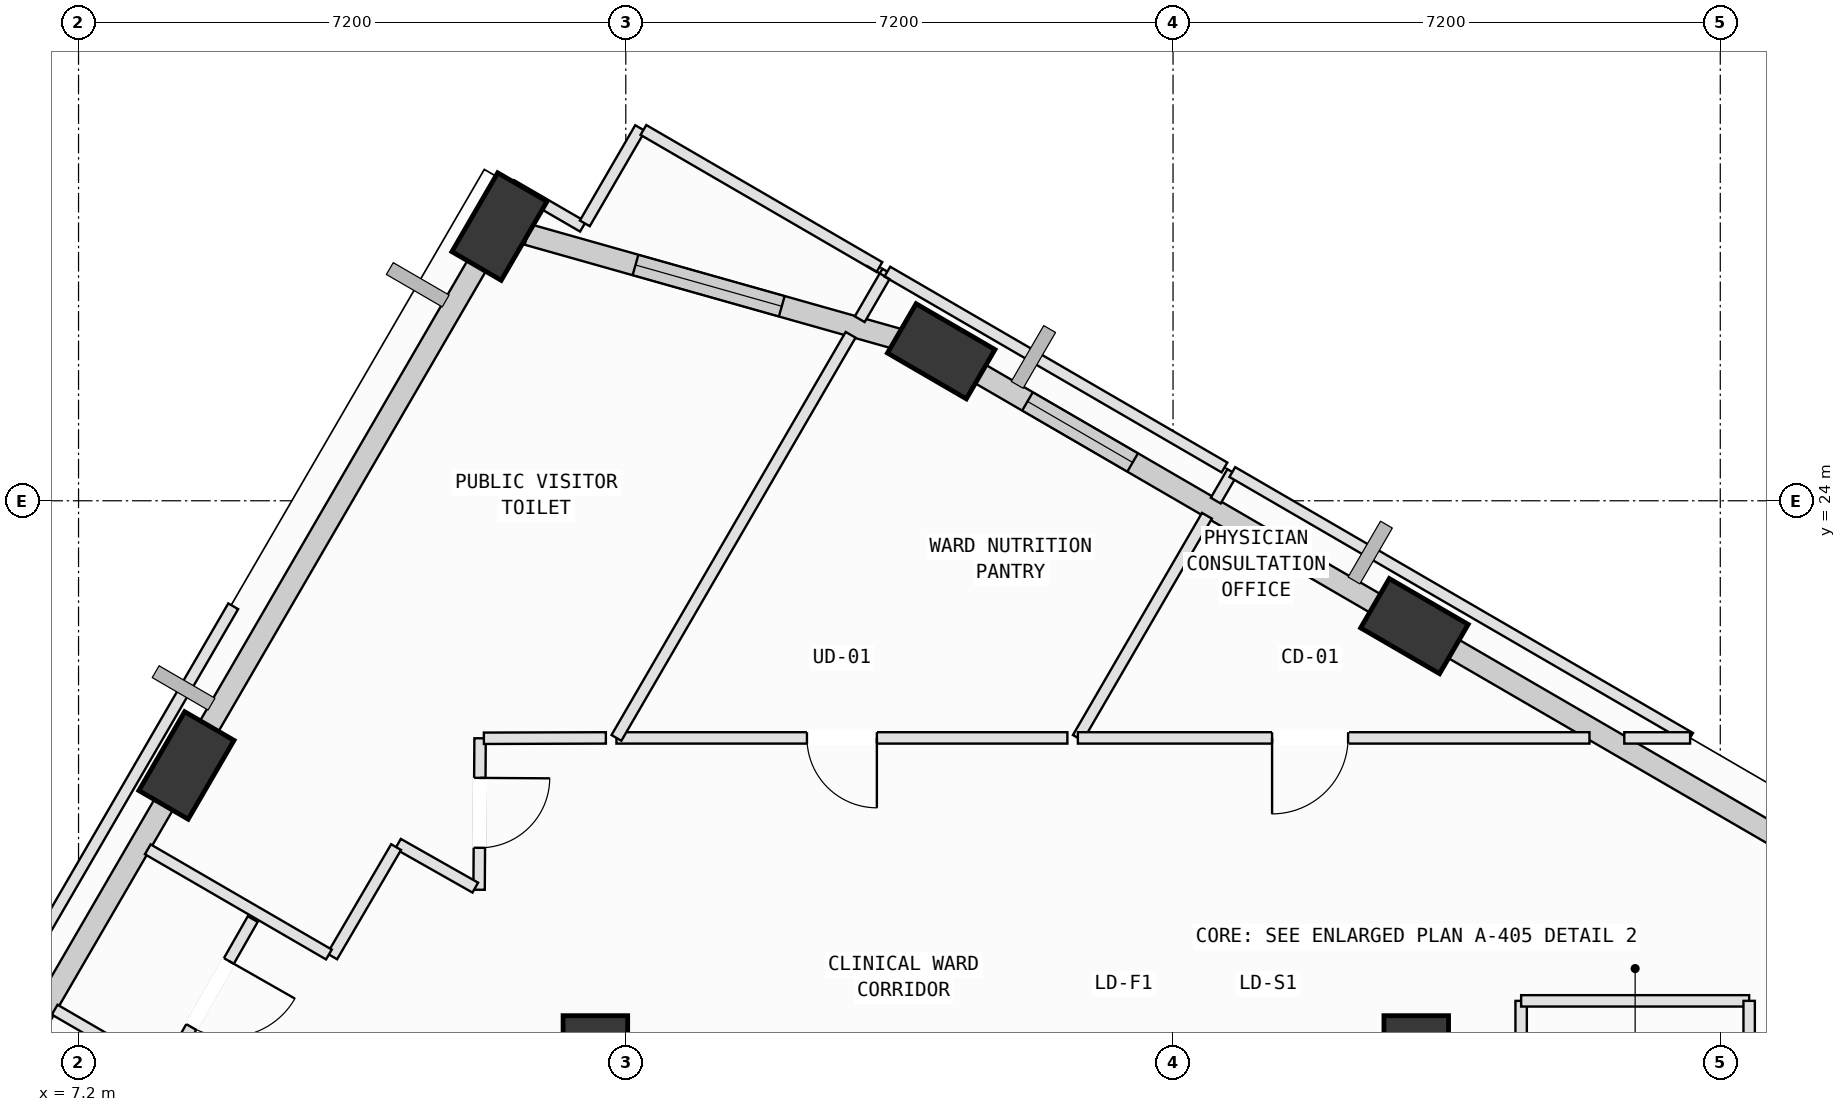
"""IFC4 building model, lengths in metres.
Left out: names, types, materials, properties, quantities, classifications, styles, units other than length and angle.
Written with IfcOpenShell. Run it as: python <this file> out.ifc"""

import sys

from ifc_helpers import new_model, si_unit, direction, frame, frame_2d, origin, origin_2d, place, context, subcontext, project, spatial, rectangle, extrude, element, fill, save


model = new_model("IFC4")
c1 = context("Model", 3, precision=1e-05, world=origin(), true_north=direction((0.0, 1.0)))
c2 = subcontext(c1, "Body", "Model", "MODEL_VIEW")
j1 = project(units=[si_unit("LENGTHUNIT", "METRE"), si_unit("PLANEANGLEUNIT", "RADIAN")], contexts=[c1])
p1 = place(None, origin())
s1 = spatial("IfcSite", under=j1, at=p1, CompositionType="ELEMENT")
p2 = place(p1, origin())
s2 = spatial("IfcBuilding", under=s1, at=p2, CompositionType="ELEMENT")
p3 = place(p2, frame((0.0, 0.0, 280.6)))
s3 = spatial("IfcBuildingStorey", under=s2, at=p3, CompositionType="ELEMENT", Elevation=280.6)
for number, where, z_axis, x_axis in (
    (1, (14.0, 16.8, 0.0), (0.0, 0.0, 1.0), (1.0, 0.0, 0.0)),
    (2, (24.8, 16.8, 0.0), (0.0, 0.0, 1.0), (1.0, 0.0, 0.0)),
):
    element("IfcColumn", number, at=place(p3, frame(where, z_axis=z_axis, x_axis=x_axis)), inside=s3, PredefinedType="COLUMN", context=c2, shape_type="SweptSolid", body=[
        extrude(rectangle(XDim=0.85, YDim=0.85, at=origin_2d()), origin(), (0.0, 0.0, 1.0), 4.0),
    ])
p4 = place(p3, frame((24.776, 22.351, 0.002), z_axis=(0.010439066111, -0.036445160635, 0.999281129695), x_axis=(-0.969488829327, 0.244394845275, 0.019041255571)))
e3 = element("IfcColumn", 3, at=p4, inside=s3, PredefinedType="COLUMN", context=c2, shape_type="SweptSolid", body=[
    extrude(rectangle(XDim=1.2, YDim=0.75, at=origin_2d()), origin(), (0.0, 0.0, 1.0), 3.999),
])
p5 = place(p3, frame((18.55, 25.967, 0.002), z_axis=(-0.004328997208, -0.062313171074, 0.998047257646), x_axis=(-0.827892947703, 0.560008026617, 0.03137319347)))
e4 = element("IfcColumn", 4, at=p5, inside=s3, PredefinedType="COLUMN", context=c2, shape_type="SweptSolid", body=[
    extrude(rectangle(XDim=1.2, YDim=0.75, at=origin_2d()), origin(), (0.0, 0.0, 1.0), 4.004),
])
p6 = place(p3, frame((12.738, 27.608, 0.002), z_axis=(-0.01089391404, -0.086238414493, 0.99621496601), x_axis=(0.60626733856, 0.791700868154, 0.075164150759)))
e5 = element("IfcColumn", 5, at=p6, inside=s3, PredefinedType="COLUMN", context=c2, shape_type="SweptSolid", body=[
    extrude(rectangle(XDim=1.2, YDim=0.75, at=origin_2d()), origin(), (0.0, 0.0, 1.0), 4.011),
])
p7 = place(p3, frame((8.62, 20.517, 0.002), z_axis=(0.018469996615, -0.102860869307, 0.994524258523), x_axis=(0.342369599911, 0.935209458744, 0.090367722847)))
e6 = element("IfcColumn", 6, at=p7, inside=s3, PredefinedType="COLUMN", context=c2, shape_type="SweptSolid", body=[
    extrude(rectangle(XDim=1.2, YDim=0.75, at=origin_2d()), origin(), (0.0, 0.0, 1.0), 4.018),
])
p8 = place(p3, frame((25.164, 22.125, 0.0), z_axis=(0.0, 0.0, 1.0), x_axis=(0.864712756105, -0.502266711448, 0.0)))
e7 = element("IfcWall", 7, at=p8, inside=s3, PredefinedType="SOLIDWALL", context=c2, shape_type="SweptSolid", body=[
    extrude(rectangle(XDim=6.958, YDim=0.28, at=frame_2d((3.479, 0.0))), origin(), (0.0, 0.0, 1.0), 3.165),
])
p9 = place(p3, frame((18.927, 25.748, 0.0), z_axis=(0.0, 0.0, 1.0), x_axis=(0.864706423905, -0.502277612936, 0.0)))
e8 = element("IfcWall", 8, at=p9, inside=s3, PredefinedType="SOLIDWALL", context=c2, shape_type="SweptSolid", body=[
    extrude(rectangle(XDim=6.424, YDim=0.28, at=frame_2d((3.212, 0.0))), origin(), (0.0, 0.0, 1.0), 3.265),
])
p10 = place(p9, frame((0.876, 0.0, 0.75)))
e9 = element("IfcOpeningElement", 9, at=p10, cuts=e8, PredefinedType="OPENING", context=c2, shape_type="SweptSolid", body=[
    extrude(rectangle(XDim=1.6, YDim=1.95, at=frame_2d((0.8, 0.975))), frame((0.0, 0.15, 0.0), z_axis=(0.0, -1.0, 0.0), x_axis=(1.0, 0.0, 0.0)), (0.0, 0.0, 1.0), 0.3),
])
p11 = place(p3, frame((13.108, 27.504, 0.0), z_axis=(0.0, 0.0, 1.0), x_axis=(0.962367273923, -0.271752148256, 0.0)))
e10 = element("IfcWall", 10, at=p11, inside=s3, PredefinedType="SOLIDWALL", context=c2, shape_type="SweptSolid", body=[
    extrude(rectangle(XDim=5.302, YDim=0.28, at=frame_2d((2.651, 0.0))), origin(), (0.0, 0.0, 1.0), 3.265),
])
p12 = place(p11, frame((1.475, 0.0, 0.75)))
e11 = element("IfcOpeningElement", 11, at=p12, cuts=e10, PredefinedType="OPENING", context=c2, shape_type="SweptSolid", body=[
    extrude(rectangle(XDim=2.0, YDim=1.95, at=frame_2d((1.0, 0.975))), frame((0.0, 0.15, 0.0), z_axis=(0.0, -1.0, 0.0), x_axis=(1.0, 0.0, 0.0)), (0.0, 0.0, 1.0), 0.3),
])
p13 = place(p3, frame((8.727, 20.702, 0.0), z_axis=(0.0, 0.0, 1.0), x_axis=(0.502244841537, 0.86472545883, 0.0)))
e12 = element("IfcWall", 12, at=p13, inside=s3, PredefinedType="SOLIDWALL", context=c2, shape_type="SweptSolid", body=[
    extrude(rectangle(XDim=7.434, YDim=0.28, at=frame_2d((3.717, 0.0))), origin(), (0.0, 0.0, 1.0), 3.265),
])
p14 = place(p3, frame((4.592, 13.584, 0.0), z_axis=(0.0, 0.0, 1.0), x_axis=(0.502274010262, 0.864708516562, 0.0)))
e13 = element("IfcWall", 13, at=p14, inside=s3, PredefinedType="SOLIDWALL", context=c2, shape_type="SweptSolid", body=[
    extrude(rectangle(XDim=7.485, YDim=0.28, at=frame_2d((3.742, 0.0))), origin(), (0.0, 0.0, 1.0), 3.265),
])
p15 = place(p3, frame((26.18, 13.6, 0.0), z_axis=(0.0, 0.0, 1.0), x_axis=(0.0, 1.0, 0.0)))
e14 = element("IfcWall", 14, at=p15, inside=s3, PredefinedType="PARTITIONING", context=c2, shape_type="SweptSolid", body=[
    extrude(rectangle(XDim=3.82, YDim=0.15, at=frame_2d((1.91, 0.0))), origin(), (0.0, 0.0, 1.0), 3.78),
])
p16 = place(p15, frame((1.45, 0.0, 0.0)))
e15 = element("IfcOpeningElement", 15, at=p16, cuts=e14, PredefinedType="OPENING", context=c2, shape_type="SweptSolid", body=[
    extrude(rectangle(XDim=0.92, YDim=2.1, at=frame_2d((0.46, 1.05))), frame((0.0, 0.085, 0.0), z_axis=(0.0, -1.0, 0.0), x_axis=(1.0, 0.0, 0.0)), (0.0, 0.0, 1.0), 0.17),
])
p17 = place(p3, frame((26.18, 17.42, 0.0), z_axis=(0.0, 0.0, 1.0), x_axis=(1.0, 0.0, 0.0)))
e16 = element("IfcWall", 16, at=p17, inside=s3, PredefinedType="PARTITIONING", context=c2, shape_type="SweptSolid", body=[
    extrude(rectangle(XDim=3.0, YDim=0.15, at=frame_2d((1.5, 0.0))), origin(), (0.0, 0.0, 1.0), 3.78),
])
p18 = place(p3, frame((29.18, 17.42, 0.0), z_axis=(0.0, 0.0, 1.0), x_axis=(0.0, -1.0, 0.0)))
e17 = element("IfcWall", 17, at=p18, inside=s3, PredefinedType="PARTITIONING", context=c2, shape_type="SweptSolid", body=[
    extrude(rectangle(XDim=3.82, YDim=0.15, at=frame_2d((1.91, 0.0))), origin(), (0.0, 0.0, 1.0), 3.78),
])
p19 = place(p3, frame((6.886, 17.304, 0.0), z_axis=(0.0, 0.0, 1.0), x_axis=(0.864667908534, -0.502343914019, 0.0)))
e18 = element("IfcWall", 18, at=p19, inside=s3, PredefinedType="PARTITIONING", context=c2, shape_type="SweptSolid", body=[
    extrude(rectangle(XDim=2.854, YDim=0.15, at=frame_2d((1.427, 0.0))), origin(), (0.0, 0.0, 1.0), 3.78),
])
p20 = place(p3, frame((20.348, 20.88, 0.0), z_axis=(0.0, 0.0, 1.0), x_axis=(0.502294056982, 0.864696871927, 0.0)))
e19 = element("IfcWall", 19, at=p20, inside=s3, PredefinedType="PARTITIONING", context=c2, shape_type="SweptSolid", body=[
    extrude(rectangle(XDim=3.38, YDim=0.15, at=frame_2d((1.69, 0.0))), origin(), (0.0, 0.0, 1.0), 3.78),
])
p21 = place(p3, frame((22.162, 24.002, 0.0), z_axis=(0.0, 0.0, 1.0), x_axis=(0.501213456245, 0.865323680064, 0.0)))
e20 = element("IfcWall", 20, at=p21, inside=s3, PredefinedType="PARTITIONING", context=c2, shape_type="SweptSolid", body=[
    extrude(rectangle(XDim=0.435, YDim=0.15, at=frame_2d((0.217, 0.0))), origin(), (0.0, 0.0, 1.0), 3.78),
])
p22 = place(p3, frame((22.38, 24.378, 0.0), z_axis=(0.0, 0.0, 1.0), x_axis=(0.864744754374, -0.502211618527, 0.0)))
e21 = element("IfcWall", 21, at=p22, inside=s3, PredefinedType="PARTITIONING", context=c2, shape_type="SweptSolid", body=[
    extrude(rectangle(XDim=6.965, YDim=0.15, at=frame_2d((3.483, 0.0))), origin(), (0.0, 0.0, 1.0), 3.78),
])
p23 = place(p3, frame((28.403, 20.88, 0.0), z_axis=(0.0, 0.0, 1.0), x_axis=(-1.0, 0.0, 0.0)))
e22 = element("IfcWall", 22, at=p23, inside=s3, PredefinedType="PARTITIONING", context=c2, shape_type="SweptSolid", body=[
    extrude(rectangle(XDim=0.866, YDim=0.15, at=frame_2d((0.433, 0.0))), origin(), (0.0, 0.0, 1.0), 3.78),
])
p24 = place(p3, frame((27.079, 20.88, 0.0), z_axis=(0.0, 0.0, 1.0), x_axis=(-1.0, 0.0, 0.0)))
e23 = element("IfcWall", 23, at=p24, inside=s3, PredefinedType="PARTITIONING", context=c2, shape_type="SweptSolid", body=[
    extrude(rectangle(XDim=6.731, YDim=0.15, at=frame_2d((3.366, 0.0))), origin(), (0.0, 0.0, 1.0), 3.415),
])
p25 = place(p24, frame((3.176, 0.0, 0.0)))
e24 = element("IfcOpeningElement", 24, at=p25, cuts=e23, PredefinedType="OPENING", context=c2, shape_type="SweptSolid", body=[
    extrude(rectangle(XDim=1.0, YDim=2.12, at=frame_2d((0.5, 1.06))), frame((0.0, 0.085, 0.0), z_axis=(0.0, -1.0, 0.0), x_axis=(1.0, 0.0, 0.0)), (0.0, 0.0, 1.0), 0.17),
])
p26 = place(p3, frame((20.21, 20.88, 0.0), z_axis=(0.0, 0.0, 1.0), x_axis=(-1.0, 0.0, 0.0)))
e25 = element("IfcWall", 25, at=p26, inside=s3, PredefinedType="PARTITIONING", context=c2, shape_type="SweptSolid", body=[
    extrude(rectangle(XDim=5.933, YDim=0.15, at=frame_2d((2.966, 0.0))), origin(), (0.0, 0.0, 1.0), 3.415),
])
p27 = place(p26, frame((2.507, 0.0, 0.0)))
e26 = element("IfcOpeningElement", 26, at=p27, cuts=e25, PredefinedType="OPENING", context=c2, shape_type="SweptSolid", body=[
    extrude(rectangle(XDim=0.92, YDim=2.1, at=frame_2d((0.46, 1.05))), frame((0.0, 0.085, 0.0), z_axis=(0.0, -1.0, 0.0), x_axis=(1.0, 0.0, 0.0)), (0.0, 0.0, 1.0), 0.17),
])
p28 = place(p3, frame((14.277, 20.88, 0.0), z_axis=(0.0, 0.0, 1.0), x_axis=(0.502251695272, 0.864721478047, 0.0)))
e27 = element("IfcWall", 27, at=p28, inside=s3, PredefinedType="PARTITIONING", context=c2, shape_type="SweptSolid", body=[
    extrude(rectangle(XDim=6.134, YDim=0.15, at=frame_2d((3.067, 0.0))), origin(), (0.0, 0.0, 1.0), 3.78),
])
p29 = place(p3, frame((17.478, 26.389, 0.0), z_axis=(0.0, 0.0, 1.0), x_axis=(0.501687794716, 0.865048759685, 0.0)))
e28 = element("IfcWall", 28, at=p29, inside=s3, PredefinedType="PARTITIONING", context=c2, shape_type="SweptSolid", body=[
    extrude(rectangle(XDim=0.724, YDim=0.15, at=frame_2d((0.362, 0.0))), origin(), (0.0, 0.0, 1.0), 3.78),
])
p30 = place(p3, frame((17.841, 27.015, 0.0), z_axis=(0.0, 0.0, 1.0), x_axis=(0.864692271202, -0.502301977025, 0.0)))
e29 = element("IfcWall", 29, at=p30, inside=s3, PredefinedType="PARTITIONING", context=c2, shape_type="SweptSolid", body=[
    extrude(rectangle(XDim=5.13, YDim=0.15, at=frame_2d((2.565, 0.0))), origin(), (0.0, 0.0, 1.0), 3.78),
])
p31 = place(p3, frame((12.483, 20.875, 0.0), z_axis=(0.0, 0.0, 1.0), x_axis=(-0.006492574166, -0.999978923018, 0.0)))
e30 = element("IfcWall", 30, at=p31, inside=s3, PredefinedType="PARTITIONING", context=c2, shape_type="SweptSolid", body=[
    extrude(rectangle(XDim=1.993, YDim=0.15, at=frame_2d((0.997, 0.0))), origin(), (0.0, 0.0, 1.0), 3.78),
])
p32 = place(p31, frame((0.521, 0.0, 0.0)))
e31 = element("IfcOpeningElement", 31, at=p32, cuts=e30, PredefinedType="OPENING", context=c2, shape_type="SweptSolid", body=[
    extrude(rectangle(XDim=0.92, YDim=2.1, at=frame_2d((0.46, 1.05))), frame((0.0, 0.085, 0.0), z_axis=(0.0, -1.0, 0.0), x_axis=(1.0, 0.0, 0.0)), (0.0, 0.0, 1.0), 0.17),
])
p33 = place(p3, frame((12.42, 18.91, 0.0), z_axis=(0.0, 0.0, 1.0), x_axis=(-0.870037118889, 0.492986218626, 0.0)))
e32 = element("IfcWall", 32, at=p33, inside=s3, PredefinedType="PARTITIONING", context=c2, shape_type="SweptSolid", body=[
    extrude(rectangle(XDim=1.169, YDim=0.15, at=frame_2d((0.584, 0.0))), origin(), (0.0, 0.0, 1.0), 3.78),
])
p34 = place(p3, frame((11.378, 19.443, 0.0), z_axis=(0.0, 0.0, 1.0), x_axis=(-0.504699947851, -0.863294829498, 0.0)))
e33 = element("IfcWall", 33, at=p34, inside=s3, PredefinedType="PARTITIONING", context=c2, shape_type="SweptSolid", body=[
    extrude(rectangle(XDim=1.666, YDim=0.15, at=frame_2d((0.833, 0.0))), origin(), (0.0, 0.0, 1.0), 3.78),
])
p35 = place(p3, frame((10.494, 18.03, 0.0), z_axis=(0.0, 0.0, 1.0), x_axis=(-0.864715714853, 0.502261617572, 0.0)))
e34 = element("IfcWall", 34, at=p35, inside=s3, PredefinedType="PARTITIONING", context=c2, shape_type="SweptSolid", body=[
    extrude(rectangle(XDim=2.756, YDim=0.15, at=frame_2d((1.378, 0.0))), origin(), (0.0, 0.0, 1.0), 3.78),
])
p36 = place(p3, frame((8.187, 20.152, 0.0), z_axis=(0.0, 0.0, 1.0), x_axis=(0.502040893347, 0.864843882679, 0.0)))
e35 = element("IfcWall", 35, at=p36, inside=s3, PredefinedType="PARTITIONING", context=c2, shape_type="SweptSolid", body=[
    extrude(rectangle(XDim=0.747, YDim=0.15, at=frame_2d((0.374, 0.0))), origin(), (0.0, 0.0, 1.0), 3.78),
])
p37 = place(p3, frame((12.296, 27.226, 0.0), z_axis=(0.0, 0.0, 1.0), x_axis=(0.502755182261, 0.864428844214, 0.0)))
e36 = element("IfcWall", 36, at=p37, inside=s3, PredefinedType="PARTITIONING", context=c2, shape_type="SweptSolid", body=[
    extrude(rectangle(XDim=1.102, YDim=0.15, at=frame_2d((0.551, 0.0))), origin(), (0.0, 0.0, 1.0), 3.265),
])
p38 = place(p3, frame((12.893, 28.154, 0.0), z_axis=(0.0, 0.0, 1.0), x_axis=(0.864930085102, -0.501892366834, 0.0)))
e37 = element("IfcWall", 37, at=p38, inside=s3, PredefinedType="PARTITIONING", context=c2, shape_type="SweptSolid", body=[
    extrude(rectangle(XDim=1.09, YDim=0.15, at=frame_2d((0.545, 0.0))), origin(), (0.0, 0.0, 1.0), 3.78),
])
p39 = place(p3, frame((13.861, 27.65, 0.0), z_axis=(0.0, 0.0, 1.0), x_axis=(0.502038037951, 0.864845540227, 0.0)))
e38 = element("IfcWall", 38, at=p39, inside=s3, PredefinedType="PARTITIONING", context=c2, shape_type="SweptSolid", body=[
    extrude(rectangle(XDim=1.45, YDim=0.15, at=frame_2d((0.725, 0.0))), origin(), (0.0, 0.0, 1.0), 3.78),
])
p40 = place(p3, frame((14.632, 28.879, 0.0), z_axis=(0.0, 0.0, 1.0), x_axis=(0.864660351157, -0.502356922055, 0.0)))
e39 = element("IfcWall", 39, at=p40, inside=s3, PredefinedType="PARTITIONING", context=c2, shape_type="SweptSolid", body=[
    extrude(rectangle(XDim=3.591, YDim=0.15, at=frame_2d((1.795, 0.0))), origin(), (0.0, 0.0, 1.0), 3.78),
])
p41 = place(p3, frame((14.138, 20.88, 0.0), z_axis=(0.0, 0.0, 1.0), x_axis=(-0.999995372275, -0.003042273722, 0.0)))
e40 = element("IfcWall", 40, at=p41, inside=s3, PredefinedType="PARTITIONING", context=c2, shape_type="SweptSolid", body=[
    extrude(rectangle(XDim=1.605, YDim=0.15, at=frame_2d((0.802, 0.0))), origin(), (0.0, 0.0, 1.0), 3.78),
])
p42 = place(p3, frame((9.492, 18.496, 0.0), z_axis=(0.0, 0.0, 1.0), x_axis=(-0.495025964314, -0.868878181712, 0.0)))
e41 = element("IfcWall", 41, at=p42, inside=s3, PredefinedType="PARTITIONING", context=c2, shape_type="SweptSolid", body=[
    extrude(rectangle(XDim=2.269, YDim=0.15, at=frame_2d((1.134, 0.0))), origin(), (0.0, 0.0, 1.0), 3.78),
])
p43 = place(p42, frame((0.634, 0.0, 0.0)))
e42 = element("IfcOpeningElement", 42, at=p43, cuts=e41, PredefinedType="OPENING", context=c2, shape_type="SweptSolid", body=[
    extrude(rectangle(XDim=1.0, YDim=2.12, at=frame_2d((0.5, 1.06))), frame((0.0, 0.085, 0.0), z_axis=(0.0, -1.0, 0.0), x_axis=(1.0, 0.0, 0.0)), (0.0, 0.0, 1.0), 0.17),
])
p44 = place(p3, frame((6.126, 17.259, 0.0), z_axis=(0.0, 0.0, 1.0), x_axis=(0.502246830531, 0.864724303591, 0.0)))
e43 = element("IfcWall", 43, at=p44, inside=s3, PredefinedType="PARTITIONING", context=c2, shape_type="SweptSolid", body=[
    extrude(rectangle(XDim=6.19, YDim=0.15, at=frame_2d((3.095, 0.0))), origin(), (0.0, 0.0, 1.0), 3.78),
])
p45 = place(p10, origin())
e44 = element("IfcWindow", 44, at=p45, inside=s3, PartitioningType="SINGLE_PANEL", PredefinedType="WINDOW", context=c2, shape_type="SweptSolid", body=[
    extrude(rectangle(XDim=1.6, YDim=1.95, at=frame_2d((0.8, 0.975))), frame((0.0, 0.03, 0.0), z_axis=(0.0, -1.0, 0.0), x_axis=(1.0, 0.0, 0.0)), (0.0, 0.0, 1.0), 0.06),
])
fill(e9, e44)
p46 = place(p12, origin())
e45 = element("IfcWindow", 45, at=p46, inside=s3, PartitioningType="SINGLE_PANEL", PredefinedType="WINDOW", context=c2, shape_type="SweptSolid", body=[
    extrude(rectangle(XDim=2.0, YDim=1.95, at=frame_2d((1.0, 0.975))), frame((0.0, 0.03, 0.0), z_axis=(0.0, -1.0, 0.0), x_axis=(1.0, 0.0, 0.0)), (0.0, 0.0, 1.0), 0.06),
])
fill(e11, e45)
p47 = place(p25, origin())
e46 = element("IfcDoor", 46, at=p47, inside=s3, OperationType="SINGLE_SWING_RIGHT", PredefinedType="DOOR", context=c2, shape_type="SweptSolid", body=[
    extrude(rectangle(XDim=1.0, YDim=2.12, at=frame_2d((0.5, 1.06))), frame((0.0, 0.025, 0.0), z_axis=(0.0, -1.0, 0.0), x_axis=(1.0, 0.0, 0.0)), (0.0, 0.0, 1.0), 0.05),
])
fill(e24, e46)
p48 = place(p27, origin())
e47 = element("IfcDoor", 47, at=p48, inside=s3, OperationType="SINGLE_SWING_LEFT", PredefinedType="DOOR", context=c2, shape_type="SweptSolid", body=[
    extrude(rectangle(XDim=0.92, YDim=2.1, at=frame_2d((0.46, 1.05))), frame((0.0, 0.025, 0.0), z_axis=(0.0, -1.0, 0.0), x_axis=(1.0, 0.0, 0.0)), (0.0, 0.0, 1.0), 0.05),
])
fill(e26, e47)
p49 = place(p32, origin())
e48 = element("IfcDoor", 48, at=p49, inside=s3, OperationType="SINGLE_SWING_LEFT", PredefinedType="DOOR", context=c2, shape_type="SweptSolid", body=[
    extrude(rectangle(XDim=0.92, YDim=2.1, at=frame_2d((0.46, 1.05))), frame((0.0, 0.025, 0.0), z_axis=(0.0, -1.0, 0.0), x_axis=(1.0, 0.0, 0.0)), (0.0, 0.0, 1.0), 0.05),
])
fill(e31, e48)
p50 = place(p43, origin())
e49 = element("IfcDoor", 49, at=p50, inside=s3, OperationType="SINGLE_SWING_LEFT", PredefinedType="DOOR", context=c2, shape_type="SweptSolid", body=[
    extrude(rectangle(XDim=1.0, YDim=2.12, at=frame_2d((0.5, 1.06))), frame((0.0, 0.025, 0.0), z_axis=(0.0, -1.0, 0.0), x_axis=(1.0, 0.0, 0.0)), (0.0, 0.0, 1.0), 0.05),
])
fill(e42, e49)
save(model, sys.argv[1])
